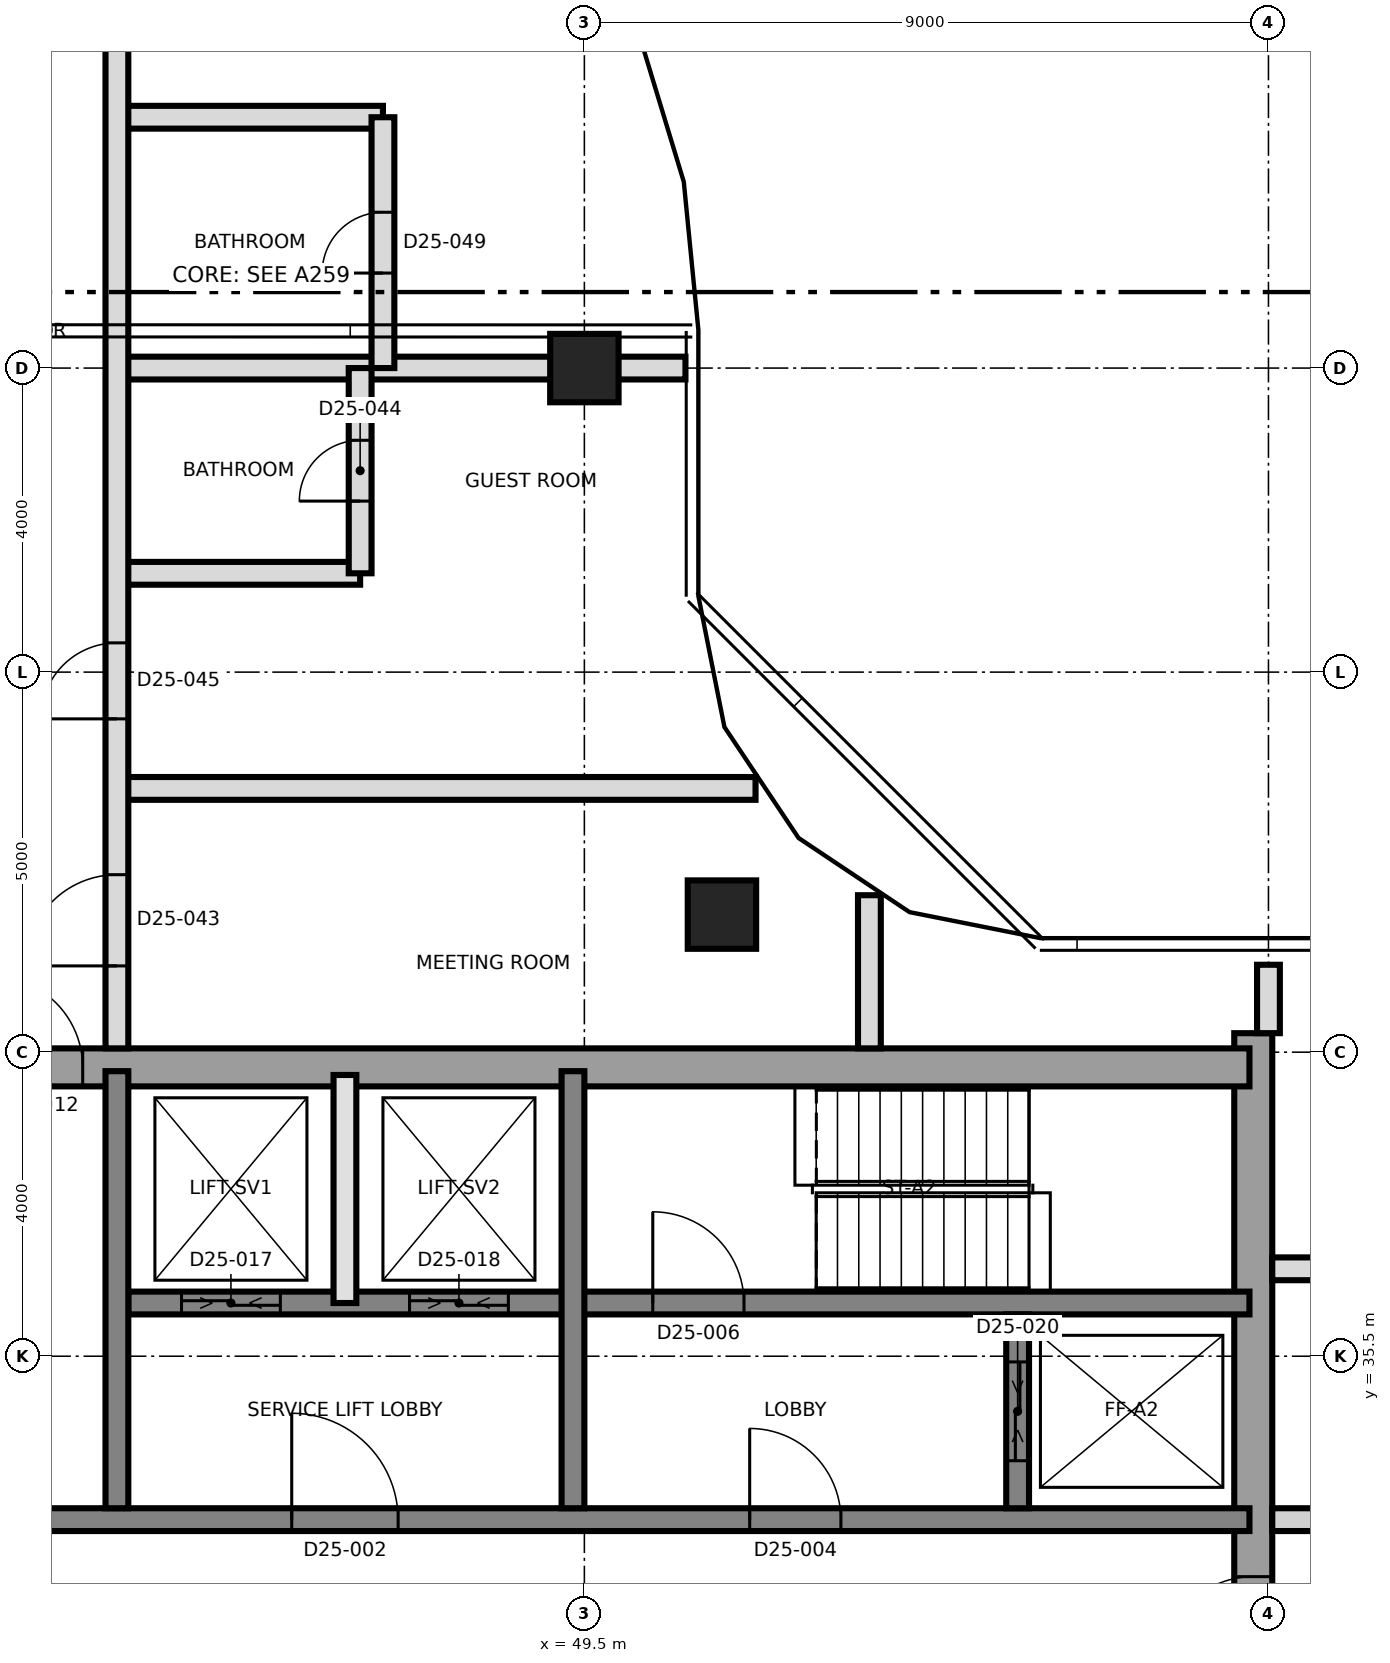
"""IFC4 building model, lengths in metres.
Left out: names, types, materials, properties, quantities, classifications, styles, units other than length and angle.
Written with IfcOpenShell. Run it as: python <this file> out.ifc"""

import sys

from ifc_helpers import new_model, si_unit, direction, frame, frame_2d, origin, origin_2d, place, context, subcontext, project, spatial, rectangle, extrude, element, fill, save


model = new_model("IFC4")
c1 = context("Model", 3, precision=1e-05, world=origin(), true_north=direction((0.0, 1.0)))
c2 = subcontext(c1, "Body", "Model", "MODEL_VIEW")
j1 = project(units=[si_unit("LENGTHUNIT", "METRE"), si_unit("PLANEANGLEUNIT", "RADIAN")], contexts=[c1])
p1 = place(None, origin())
s1 = spatial("IfcSite", under=j1, at=p1, CompositionType="ELEMENT")
p2 = place(p1, origin())
s2 = spatial("IfcBuilding", under=s1, at=p2, CompositionType="ELEMENT")
p3 = place(p2, frame((0.0, 0.0, 225.4)))
s3 = spatial("IfcBuildingStorey", under=s2, at=p3, CompositionType="ELEMENT", Elevation=225.4)
p4 = place(p3, frame((58.3, 21.25, 0.0), z_axis=(0.0, 0.0, 1.0), x_axis=(0.0, 1.0, 0.0)))
e1 = element("IfcWall", 1, at=p4, inside=s3, PredefinedType="SHEAR", context=c2, shape_type="SweptSolid", body=[
    extrude(rectangle(XDim=18.5, YDim=0.5, at=frame_2d((9.25, 0.0))), origin(), (0.0, 0.0, 1.0), 3.7),
])
p5 = place(p4, frame((10.15, 0.0, 0.0)))
e2 = element("IfcOpeningElement", 2, at=p5, cuts=e1, PredefinedType="OPENING", context=c2, shape_type="SweptSolid", body=[
    extrude(rectangle(XDim=1.2, YDim=2.1, at=frame_2d((0.6, 1.05))), frame((0.0, 0.26, 0.0), z_axis=(0.0, -1.0, 0.0), x_axis=(1.0, 0.0, 0.0)), (0.0, 0.0, 1.0), 0.52),
])
p6 = place(p3, frame((31.25, 39.3, 0.0), z_axis=(0.0, 0.0, 1.0), x_axis=(1.0, 0.0, 0.0)))
e3 = element("IfcWall", 3, at=p6, inside=s3, PredefinedType="SHEAR", context=c2, shape_type="SweptSolid", body=[
    extrude(rectangle(XDim=27.0, YDim=0.5, at=frame_2d((13.5, 0.0))), origin(), (0.0, 0.0, 1.0), 3.7),
])
p7 = place(p6, frame((10.45, 0.0, 0.0)))
e4 = element("IfcOpeningElement", 4, at=p7, cuts=e3, PredefinedType="OPENING", context=c2, shape_type="SweptSolid", body=[
    extrude(rectangle(XDim=1.2, YDim=2.1, at=frame_2d((0.6, 1.05))), frame((0.0, 0.26, 0.0), z_axis=(0.0, -1.0, 0.0), x_axis=(1.0, 0.0, 0.0)), (0.0, 0.0, 1.0), 0.52),
])
p8 = place(p3, frame((31.75, 33.35, 0.0), z_axis=(0.0, 0.0, 1.0), x_axis=(1.0, 0.0, 0.0)))
e5 = element("IfcWall", 5, at=p8, inside=s3, PredefinedType="SHEAR", context=c2, shape_type="SweptSolid", body=[
    extrude(rectangle(XDim=26.5, YDim=0.3, at=frame_2d((13.25, 0.0))), origin(), (0.0, 0.0, 1.0), 3.7),
])
p9 = place(p8, frame((13.9, 0.0, 0.0)))
e6 = element("IfcOpeningElement", 6, at=p9, cuts=e5, PredefinedType="OPENING", context=c2, shape_type="SweptSolid", body=[
    extrude(rectangle(XDim=1.4, YDim=2.1, at=frame_2d((0.7, 1.05))), frame((0.0, 0.16, 0.0), z_axis=(0.0, -1.0, 0.0), x_axis=(1.0, 0.0, 0.0)), (0.0, 0.0, 1.0), 0.32),
])
p10 = place(p8, frame((5.375, 0.0, 0.0)))
e7 = element("IfcOpeningElement", 7, at=p10, cuts=e5, PredefinedType="OPENING", context=c2, shape_type="SweptSolid", body=[
    extrude(rectangle(XDim=1.2, YDim=2.1, at=frame_2d((0.6, 1.05))), frame((0.0, 0.16, 0.0), z_axis=(0.0, -1.0, 0.0), x_axis=(1.0, 0.0, 0.0)), (0.0, 0.0, 1.0), 0.32),
])
p11 = place(p8, frame((19.925, 0.0, 0.0)))
e8 = element("IfcOpeningElement", 8, at=p11, cuts=e5, PredefinedType="OPENING", context=c2, shape_type="SweptSolid", body=[
    extrude(rectangle(XDim=1.2, YDim=2.1, at=frame_2d((0.6, 1.05))), frame((0.0, 0.16, 0.0), z_axis=(0.0, -1.0, 0.0), x_axis=(1.0, 0.0, 0.0)), (0.0, 0.0, 1.0), 0.32),
])
p12 = place(p3, frame((43.5, 36.2, 0.0), z_axis=(0.0, 0.0, 1.0), x_axis=(1.0, 0.0, 0.0)))
e9 = element("IfcWall", 9, at=p12, inside=s3, PredefinedType="SHEAR", context=c2, shape_type="SweptSolid", body=[
    extrude(rectangle(XDim=14.75, YDim=0.3, at=frame_2d((7.375, 0.0))), origin(), (0.0, 0.0, 1.0), 3.7),
])
p13 = place(p12, frame((6.9, 0.0, 0.0)))
e10 = element("IfcOpeningElement", 10, at=p13, cuts=e9, PredefinedType="OPENING", context=c2, shape_type="SweptSolid", body=[
    extrude(rectangle(XDim=1.2, YDim=2.1, at=frame_2d((0.6, 1.05))), frame((0.0, 0.16, 0.0), z_axis=(0.0, -1.0, 0.0), x_axis=(1.0, 0.0, 0.0)), (0.0, 0.0, 1.0), 0.32),
])
p14 = place(p12, frame((0.7, 0.0, 0.0)))
e11 = element("IfcOpeningElement", 11, at=p14, cuts=e9, PredefinedType="OPENING", context=c2, shape_type="SweptSolid", body=[
    extrude(rectangle(XDim=1.3, YDim=2.4, at=frame_2d((0.65, 1.2))), frame((0.0, 0.16, 0.0), z_axis=(0.0, -1.0, 0.0), x_axis=(1.0, 0.0, 0.0)), (0.0, 0.0, 1.0), 0.32),
])
p15 = place(p12, frame((3.7, 0.0, 0.0)))
e12 = element("IfcOpeningElement", 12, at=p15, cuts=e9, PredefinedType="OPENING", context=c2, shape_type="SweptSolid", body=[
    extrude(rectangle(XDim=1.3, YDim=2.4, at=frame_2d((0.65, 1.2))), frame((0.0, 0.16, 0.0), z_axis=(0.0, -1.0, 0.0), x_axis=(1.0, 0.0, 0.0)), (0.0, 0.0, 1.0), 0.32),
])
for number, where, z_axis, x_axis in (
    (13, (43.35, 33.5, 0.0), (0.0, 0.0, 1.0), (0.0, 1.0, 0.0)),
    (14, (49.35, 33.5, 0.0), (0.0, 0.0, 1.0), (0.0, 1.0, 0.0)),
):
    element("IfcWall", number, at=place(p3, frame(where, z_axis=z_axis, x_axis=x_axis)), inside=s3, PredefinedType="SHEAR", context=c2, shape_type="SweptSolid", body=[
        extrude(rectangle(XDim=5.75, YDim=0.3, at=frame_2d((2.875, 0.0))), origin(), (0.0, 0.0, 1.0), 3.7),
    ])
p16 = place(p3, frame((55.2, 33.5, 0.0), z_axis=(0.0, 0.0, 1.0), x_axis=(0.0, 1.0, 0.0)))
e15 = element("IfcWall", 15, at=p16, inside=s3, PredefinedType="SHEAR", context=c2, shape_type="SweptSolid", body=[
    extrude(rectangle(XDim=2.55, YDim=0.3, at=frame_2d((1.275, 0.0))), origin(), (0.0, 0.0, 1.0), 3.7),
])
p17 = place(p16, frame((0.625, 0.0, 0.0)))
e16 = element("IfcOpeningElement", 16, at=p17, cuts=e15, PredefinedType="OPENING", context=c2, shape_type="SweptSolid", body=[
    extrude(rectangle(XDim=1.3, YDim=2.4, at=frame_2d((0.65, 1.2))), frame((0.0, 0.16, 0.0), z_axis=(0.0, -1.0, 0.0), x_axis=(1.0, 0.0, 0.0)), (0.0, 0.0, 1.0), 0.32),
])
for number, where, z_axis, x_axis in (
    (17, (51.31, 41.31, 0.0), (0.0, 0.0, 1.0), (1.0, 0.0, 0.0)),
    (18, (49.5, 48.5, 0.0), (0.0, 0.0, 1.0), (1.0, 0.0, 0.0)),
):
    element("IfcColumn", number, at=place(p3, frame(where, z_axis=z_axis, x_axis=x_axis)), inside=s3, PredefinedType="COLUMN", context=c2, shape_type="SweptSolid", body=[
        extrude(rectangle(XDim=0.9, YDim=0.9, at=origin_2d()), origin(), (0.0, 0.0, 1.0), 3.7),
    ])
p18 = place(p3, frame((46.35, 36.2, 0.0), z_axis=(0.0, 0.0, 1.0), x_axis=(0.0, 1.0, 0.0)))
e19 = element("IfcWall", 19, at=p18, inside=s3, PredefinedType="SOLIDWALL", context=c2, shape_type="SweptSolid", body=[
    extrude(rectangle(XDim=3.0, YDim=0.3, at=frame_2d((1.5, 0.0))), origin(), (0.0, 0.0, 1.0), 3.4),
])
p19 = place(p3, frame((58.55, 33.35, 0.0), z_axis=(0.0, 0.0, 1.0), x_axis=(1.0, 0.0, 0.0)))
e20 = element("IfcWall", 20, at=p19, inside=s3, PredefinedType="PARTITIONING", context=c2, shape_type="SweptSolid", body=[
    extrude(rectangle(XDim=26.78, YDim=0.3, at=frame_2d((13.39, 0.0))), origin(), (0.0, 0.0, 1.0), 3.4),
])
p20 = place(p19, frame((3.95, 0.0, 0.0)))
e21 = element("IfcOpeningElement", 21, at=p20, cuts=e20, PredefinedType="OPENING", context=c2, shape_type="SweptSolid", body=[
    extrude(rectangle(XDim=1.0, YDim=2.4, at=frame_2d((0.5, 1.2))), frame((0.0, 0.16, 0.0), z_axis=(0.0, -1.0, 0.0), x_axis=(1.0, 0.0, 0.0)), (0.0, 0.0, 1.0), 0.32),
])
p21 = place(p19, frame((10.085, 0.0, 0.0)))
e22 = element("IfcOpeningElement", 22, at=p21, cuts=e20, PredefinedType="OPENING", context=c2, shape_type="SweptSolid", body=[
    extrude(rectangle(XDim=1.2, YDim=2.1, at=frame_2d((0.6, 1.05))), frame((0.0, 0.16, 0.0), z_axis=(0.0, -1.0, 0.0), x_axis=(1.0, 0.0, 0.0)), (0.0, 0.0, 1.0), 0.32),
])
p22 = place(p19, frame((13.335, 0.0, 0.0)))
e23 = element("IfcOpeningElement", 23, at=p22, cuts=e20, PredefinedType="OPENING", context=c2, shape_type="SweptSolid", body=[
    extrude(rectangle(XDim=1.0, YDim=2.1, at=frame_2d((0.5, 1.05))), frame((0.0, 0.16, 0.0), z_axis=(0.0, -1.0, 0.0), x_axis=(1.0, 0.0, 0.0)), (0.0, 0.0, 1.0), 0.32),
])
p23 = place(p19, frame((20.3, 0.0, 0.0)))
e24 = element("IfcOpeningElement", 24, at=p23, cuts=e20, PredefinedType="OPENING", context=c2, shape_type="SweptSolid", body=[
    extrude(rectangle(XDim=1.0, YDim=2.4, at=frame_2d((0.5, 1.2))), frame((0.0, 0.16, 0.0), z_axis=(0.0, -1.0, 0.0), x_axis=(1.0, 0.0, 0.0)), (0.0, 0.0, 1.0), 0.32),
])
p24 = place(p3, frame((58.55, 36.65, 0.0), z_axis=(0.0, 0.0, 1.0), x_axis=(1.0, 0.0, 0.0)))
e25 = element("IfcWall", 25, at=p24, inside=s3, PredefinedType="PARTITIONING", context=c2, shape_type="SweptSolid", body=[
    extrude(rectangle(XDim=2.95, YDim=0.3, at=frame_2d((1.475, 0.0))), origin(), (0.0, 0.0, 1.0), 3.4),
])
p25 = place(p24, frame((1.05, 0.0, 0.0)))
e26 = element("IfcOpeningElement", 26, at=p25, cuts=e25, PredefinedType="OPENING", context=c2, shape_type="SweptSolid", body=[
    extrude(rectangle(XDim=0.8, YDim=2.1, at=frame_2d((0.4, 1.05))), frame((0.0, 0.16, 0.0), z_axis=(0.0, -1.0, 0.0), x_axis=(1.0, 0.0, 0.0)), (0.0, 0.0, 1.0), 0.32),
])
p26 = place(p3, frame((43.35, 42.97, 0.0), z_axis=(0.0, 0.0, 1.0), x_axis=(1.0, 0.0, 0.0)))
e27 = element("IfcWall", 27, at=p26, inside=s3, PredefinedType="PARTITIONING", context=c2, shape_type="SweptSolid", body=[
    extrude(rectangle(XDim=8.402, YDim=0.3, at=frame_2d((4.201, 0.0))), origin(), (0.0, 0.0, 1.0), 3.4),
])
p27 = place(p3, frame((43.35, 45.8, 0.0), z_axis=(0.0, 0.0, 1.0), x_axis=(1.0, 0.0, 0.0)))
e28 = element("IfcWall", 28, at=p27, inside=s3, PredefinedType="PARTITIONING", context=c2, shape_type="SweptSolid", body=[
    extrude(rectangle(XDim=3.2, YDim=0.3, at=frame_2d((1.6, 0.0))), origin(), (0.0, 0.0, 1.0), 3.4),
])
p28 = place(p3, frame((43.35, 48.5, 0.0), z_axis=(0.0, 0.0, 1.0), x_axis=(1.0, 0.0, 0.0)))
e29 = element("IfcWall", 29, at=p28, inside=s3, PredefinedType="PARTITIONING", context=c2, shape_type="SweptSolid", body=[
    extrude(rectangle(XDim=7.48, YDim=0.3, at=frame_2d((3.74, 0.0))), origin(), (0.0, 0.0, 1.0), 3.4),
])
p29 = place(p3, frame((43.35, 51.8, 0.0), z_axis=(0.0, 0.0, 1.0), x_axis=(1.0, 0.0, 0.0)))
e30 = element("IfcWall", 30, at=p29, inside=s3, PredefinedType="PARTITIONING", context=c2, shape_type="SweptSolid", body=[
    extrude(rectangle(XDim=3.5, YDim=0.3, at=frame_2d((1.75, 0.0))), origin(), (0.0, 0.0, 1.0), 3.4),
])
p30 = place(p3, frame((43.35, 39.55, 0.0), z_axis=(0.0, 0.0, 1.0), x_axis=(0.0, 1.0, 0.0)))
e31 = element("IfcWall", 31, at=p30, inside=s3, PredefinedType="PARTITIONING", context=c2, shape_type="SweptSolid", body=[
    extrude(rectangle(XDim=18.771, YDim=0.3, at=frame_2d((9.385, 0.0))), origin(), (0.0, 0.0, 1.0), 3.4),
])
p31 = place(p30, frame((1.085, 0.0, 0.0)))
e32 = element("IfcOpeningElement", 32, at=p31, cuts=e31, PredefinedType="OPENING", context=c2, shape_type="SweptSolid", body=[
    extrude(rectangle(XDim=1.2, YDim=2.1, at=frame_2d((0.6, 1.05))), frame((0.0, 0.16, 0.0), z_axis=(0.0, -1.0, 0.0), x_axis=(1.0, 0.0, 0.0)), (0.0, 0.0, 1.0), 0.32),
])
p32 = place(p30, frame((4.335, 0.0, 0.0)))
e33 = element("IfcOpeningElement", 33, at=p32, cuts=e31, PredefinedType="OPENING", context=c2, shape_type="SweptSolid", body=[
    extrude(rectangle(XDim=1.0, YDim=2.1, at=frame_2d((0.5, 1.05))), frame((0.0, 0.16, 0.0), z_axis=(0.0, -1.0, 0.0), x_axis=(1.0, 0.0, 0.0)), (0.0, 0.0, 1.0), 0.32),
])
p33 = place(p30, frame((14.6, 0.0, 0.0)))
e34 = element("IfcOpeningElement", 34, at=p33, cuts=e31, PredefinedType="OPENING", context=c2, shape_type="SweptSolid", body=[
    extrude(rectangle(XDim=1.0, YDim=2.4, at=frame_2d((0.5, 1.2))), frame((0.0, 0.16, 0.0), z_axis=(0.0, -1.0, 0.0), x_axis=(1.0, 0.0, 0.0)), (0.0, 0.0, 1.0), 0.32),
])
p34 = place(p3, frame((46.55, 45.8, 0.0), z_axis=(0.0, 0.0, 1.0), x_axis=(0.0, 1.0, 0.0)))
e35 = element("IfcWall", 35, at=p34, inside=s3, PredefinedType="PARTITIONING", context=c2, shape_type="SweptSolid", body=[
    extrude(rectangle(XDim=2.7, YDim=0.3, at=frame_2d((1.35, 0.0))), origin(), (0.0, 0.0, 1.0), 3.4),
])
p35 = place(p34, frame((0.95, 0.0, 0.0)))
e36 = element("IfcOpeningElement", 36, at=p35, cuts=e35, PredefinedType="OPENING", context=c2, shape_type="SweptSolid", body=[
    extrude(rectangle(XDim=0.8, YDim=2.1, at=frame_2d((0.4, 1.05))), frame((0.0, 0.16, 0.0), z_axis=(0.0, -1.0, 0.0), x_axis=(1.0, 0.0, 0.0)), (0.0, 0.0, 1.0), 0.32),
])
p36 = place(p3, frame((46.85, 48.5, 0.0), z_axis=(0.0, 0.0, 1.0), x_axis=(0.0, 1.0, 0.0)))
e37 = element("IfcWall", 37, at=p36, inside=s3, PredefinedType="PARTITIONING", context=c2, shape_type="SweptSolid", body=[
    extrude(rectangle(XDim=3.3, YDim=0.3, at=frame_2d((1.65, 0.0))), origin(), (0.0, 0.0, 1.0), 3.4),
])
p37 = place(p36, frame((1.25, 0.0, 0.0)))
e38 = element("IfcOpeningElement", 38, at=p37, cuts=e37, PredefinedType="OPENING", context=c2, shape_type="SweptSolid", body=[
    extrude(rectangle(XDim=0.8, YDim=2.1, at=frame_2d((0.4, 1.05))), frame((0.0, 0.16, 0.0), z_axis=(0.0, -1.0, 0.0), x_axis=(1.0, 0.0, 0.0)), (0.0, 0.0, 1.0), 0.32),
])
p38 = place(p3, frame((53.25, 39.55, 0.0), z_axis=(0.0, 0.0, 1.0), x_axis=(0.0, 1.0, 0.0)))
e39 = element("IfcWall", 39, at=p38, inside=s3, PredefinedType="PARTITIONING", context=c2, shape_type="SweptSolid", body=[
    extrude(rectangle(XDim=2.015, YDim=0.3, at=frame_2d((1.007, 0.0))), origin(), (0.0, 0.0, 1.0), 3.4),
])
p39 = place(p3, frame((58.5, 39.75, 0.0), z_axis=(0.0, 0.0, 1.0), x_axis=(0.0, 1.0, 0.0)))
e40 = element("IfcWall", 40, at=p39, inside=s3, PredefinedType="PARTITIONING", context=c2, shape_type="SweptSolid", body=[
    extrude(rectangle(XDim=0.9, YDim=0.3, at=frame_2d((0.45, 0.0))), origin(), (0.0, 0.0, 1.0), 3.4),
])
p40 = place(p9, origin())
e41 = element("IfcDoor", 41, at=p40, inside=s3, OperationType="SINGLE_SWING_RIGHT", PredefinedType="DOOR", context=c2, shape_type="SweptSolid", body=[
    extrude(rectangle(XDim=1.4, YDim=2.1, at=frame_2d((0.7, 1.05))), frame((0.0, 0.025, 0.0), z_axis=(0.0, -1.0, 0.0), x_axis=(1.0, 0.0, 0.0)), (0.0, 0.0, 1.0), 0.05),
])
fill(e6, e41)
p41 = place(p11, origin())
e42 = element("IfcDoor", 42, at=p41, inside=s3, OperationType="SINGLE_SWING_RIGHT", PredefinedType="DOOR", context=c2, shape_type="SweptSolid", body=[
    extrude(rectangle(XDim=1.2, YDim=2.1, at=frame_2d((0.6, 1.05))), frame((0.0, 0.025, 0.0), z_axis=(0.0, -1.0, 0.0), x_axis=(1.0, 0.0, 0.0)), (0.0, 0.0, 1.0), 0.05),
])
fill(e8, e42)
p42 = place(p13, origin())
e43 = element("IfcDoor", 43, at=p42, inside=s3, OperationType="SINGLE_SWING_LEFT", PredefinedType="DOOR", context=c2, shape_type="SweptSolid", body=[
    extrude(rectangle(XDim=1.2, YDim=2.1, at=frame_2d((0.6, 1.05))), frame((0.0, 0.025, 0.0), z_axis=(0.0, -1.0, 0.0), x_axis=(1.0, 0.0, 0.0)), (0.0, 0.0, 1.0), 0.05),
])
fill(e10, e43)
p43 = place(p5, origin())
e44 = element("IfcDoor", 44, at=p43, inside=s3, OperationType="SINGLE_SWING_LEFT", PredefinedType="DOOR", context=c2, shape_type="SweptSolid", body=[
    extrude(rectangle(XDim=1.2, YDim=2.1, at=frame_2d((0.6, 1.05))), frame((0.0, 0.025, 0.0), z_axis=(0.0, -1.0, 0.0), x_axis=(1.0, 0.0, 0.0)), (0.0, 0.0, 1.0), 0.05),
])
fill(e2, e44)
p44 = place(p7, origin())
e45 = element("IfcDoor", 45, at=p44, inside=s3, OperationType="SINGLE_SWING_RIGHT", PredefinedType="DOOR", context=c2, shape_type="SweptSolid", body=[
    extrude(rectangle(XDim=1.2, YDim=2.1, at=frame_2d((0.6, 1.05))), frame((0.0, 0.025, 0.0), z_axis=(0.0, -1.0, 0.0), x_axis=(1.0, 0.0, 0.0)), (0.0, 0.0, 1.0), 0.05),
])
fill(e4, e45)
p45 = place(p14, origin())
e46 = element("IfcDoor", 46, at=p45, inside=s3, OperationType="SLIDING_TO_LEFT", PredefinedType="DOOR", context=c2, shape_type="SweptSolid", body=[
    extrude(rectangle(XDim=1.3, YDim=2.4, at=frame_2d((0.65, 1.2))), frame((0.0, 0.025, 0.0), z_axis=(0.0, -1.0, 0.0), x_axis=(1.0, 0.0, 0.0)), (0.0, 0.0, 1.0), 0.05),
])
fill(e11, e46)
p46 = place(p15, origin())
e47 = element("IfcDoor", 47, at=p46, inside=s3, OperationType="SLIDING_TO_LEFT", PredefinedType="DOOR", context=c2, shape_type="SweptSolid", body=[
    extrude(rectangle(XDim=1.3, YDim=2.4, at=frame_2d((0.65, 1.2))), frame((0.0, 0.025, 0.0), z_axis=(0.0, -1.0, 0.0), x_axis=(1.0, 0.0, 0.0)), (0.0, 0.0, 1.0), 0.05),
])
fill(e12, e47)
p47 = place(p17, origin())
e48 = element("IfcDoor", 48, at=p47, inside=s3, OperationType="SLIDING_TO_LEFT", PredefinedType="DOOR", context=c2, shape_type="SweptSolid", body=[
    extrude(rectangle(XDim=1.3, YDim=2.4, at=frame_2d((0.65, 1.2))), frame((0.0, 0.025, 0.0), z_axis=(0.0, -1.0, 0.0), x_axis=(1.0, 0.0, 0.0)), (0.0, 0.0, 1.0), 0.05),
])
fill(e16, e48)
p48 = place(p31, origin())
e49 = element("IfcDoor", 49, at=p48, inside=s3, OperationType="SINGLE_SWING_RIGHT", PredefinedType="DOOR", context=c2, shape_type="SweptSolid", body=[
    extrude(rectangle(XDim=1.2, YDim=2.1, at=frame_2d((0.6, 1.05))), frame((0.0, 0.025, 0.0), z_axis=(0.0, -1.0, 0.0), x_axis=(1.0, 0.0, 0.0)), (0.0, 0.0, 1.0), 0.05),
])
fill(e32, e49)
p49 = place(p35, origin())
e50 = element("IfcDoor", 50, at=p49, inside=s3, OperationType="SINGLE_SWING_LEFT", PredefinedType="DOOR", context=c2, shape_type="SweptSolid", body=[
    extrude(rectangle(XDim=0.8, YDim=2.1, at=frame_2d((0.4, 1.05))), frame((0.0, 0.025, 0.0), z_axis=(0.0, -1.0, 0.0), x_axis=(1.0, 0.0, 0.0)), (0.0, 0.0, 1.0), 0.05),
])
fill(e36, e50)
p50 = place(p32, origin())
e51 = element("IfcDoor", 51, at=p50, inside=s3, OperationType="SINGLE_SWING_LEFT", PredefinedType="DOOR", context=c2, shape_type="SweptSolid", body=[
    extrude(rectangle(XDim=1.0, YDim=2.1, at=frame_2d((0.5, 1.05))), frame((0.0, 0.025, 0.0), z_axis=(0.0, -1.0, 0.0), x_axis=(1.0, 0.0, 0.0)), (0.0, 0.0, 1.0), 0.05),
])
fill(e33, e51)
p51 = place(p37, origin())
e52 = element("IfcDoor", 52, at=p51, inside=s3, OperationType="SINGLE_SWING_LEFT", PredefinedType="DOOR", context=c2, shape_type="SweptSolid", body=[
    extrude(rectangle(XDim=0.8, YDim=2.1, at=frame_2d((0.4, 1.05))), frame((0.0, 0.025, 0.0), z_axis=(0.0, -1.0, 0.0), x_axis=(1.0, 0.0, 0.0)), (0.0, 0.0, 1.0), 0.05),
])
fill(e38, e52)
save(model, sys.argv[1])
